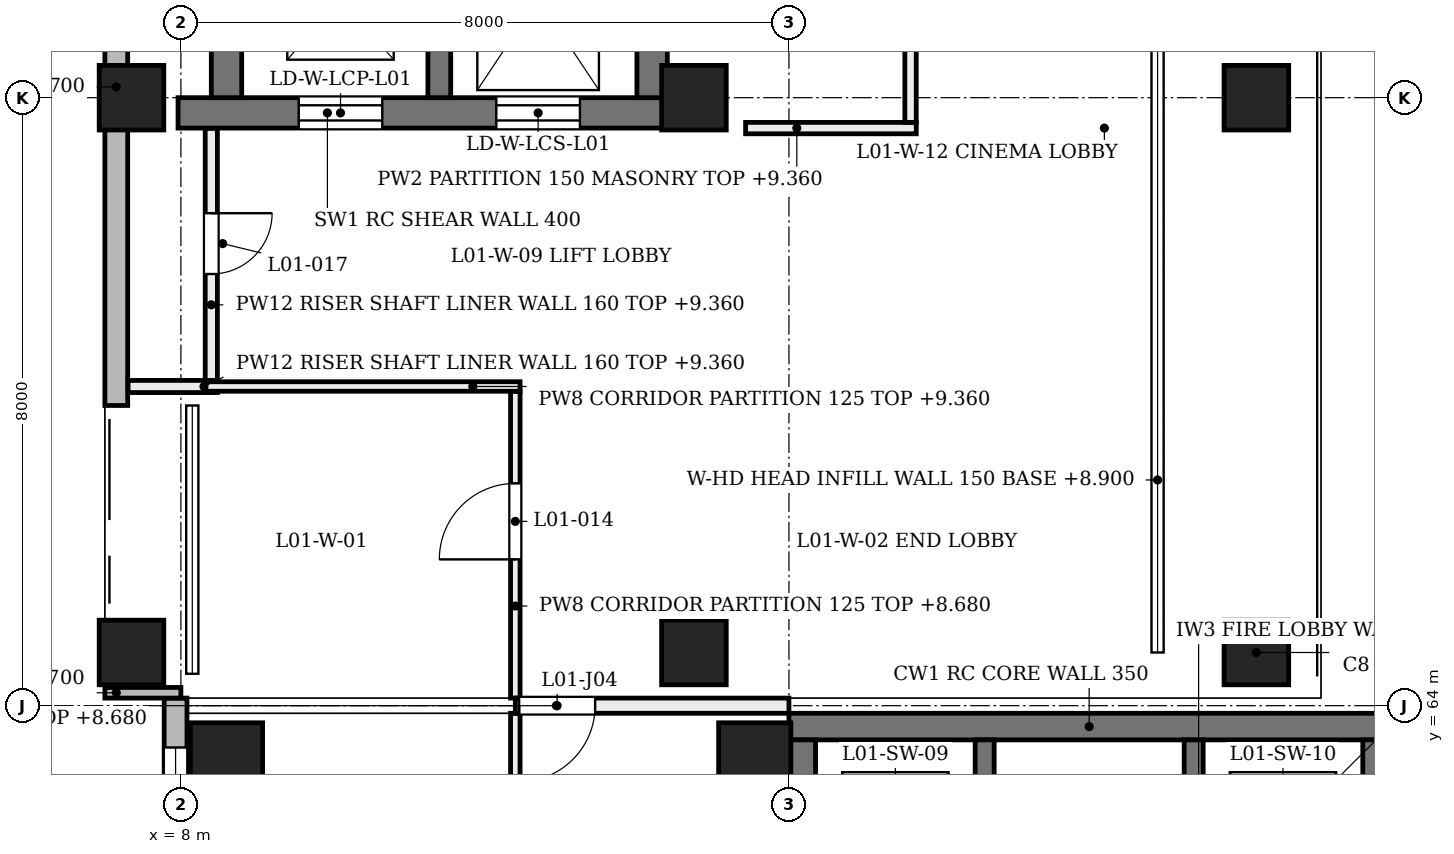
"""IFC4 building model, lengths in metres.
Left out: names, types, materials, properties, quantities, classifications, styles, units other than length and angle.
Written with IfcOpenShell. Run it as: python <this file> out.ifc"""

import sys

from ifc_helpers import new_model, si_unit, direction, frame, frame_2d, origin, origin_2d, place, context, subcontext, project, spatial, rectangle, extrude, element, fill, save


model = new_model("IFC4")
c1 = context("Model", 3, precision=1e-05, world=origin(), true_north=direction((0.0, 1.0)))
c2 = subcontext(c1, "Body", "Model", "MODEL_VIEW")
j1 = project(units=[si_unit("LENGTHUNIT", "METRE"), si_unit("PLANEANGLEUNIT", "RADIAN")], contexts=[c1])
p1 = place(None, origin())
s1 = spatial("IfcSite", under=j1, at=p1, CompositionType="ELEMENT")
p2 = place(p1, origin())
s2 = spatial("IfcBuilding", under=s1, at=p2, CompositionType="ELEMENT")
p3 = place(p2, frame((0.0, 0.0, 4.8)))
s3 = spatial("IfcBuildingStorey", under=s2, at=p3, CompositionType="ELEMENT", Elevation=4.8)
p4 = place(p3, frame((7.962, 71.8, 0.0), z_axis=(0.0, 0.0, 1.0), x_axis=(1.0, 0.0, 0.0)))
e1 = element("IfcWall", 1, at=p4, inside=s3, PredefinedType="SHEAR", context=c2, shape_type="SweptSolid", body=[
    extrude(rectangle(XDim=6.55, YDim=0.4, at=frame_2d((3.275, 0.0))), origin(), (0.0, 0.0, 1.0), 4.58),
])
p5 = place(p4, frame((1.587, 0.0, 0.0)))
e2 = element("IfcOpeningElement", 2, at=p5, cuts=e1, PredefinedType="OPENING", context=c2, shape_type="SweptSolid", body=[
    extrude(rectangle(XDim=1.1, YDim=2.1, at=frame_2d((0.55, 1.05))), frame((0.0, 0.21, 0.0), z_axis=(0.0, -1.0, 0.0), x_axis=(1.0, 0.0, 0.0)), (0.0, 0.0, 1.0), 0.42),
])
p6 = place(p4, frame((4.188, 0.0, 0.0)))
e3 = element("IfcOpeningElement", 3, at=p6, cuts=e1, PredefinedType="OPENING", context=c2, shape_type="SweptSolid", body=[
    extrude(rectangle(XDim=1.1, YDim=2.1, at=frame_2d((0.55, 1.05))), frame((0.0, 0.21, 0.0), z_axis=(0.0, -1.0, 0.0), x_axis=(1.0, 0.0, 0.0)), (0.0, 0.0, 1.0), 0.42),
])
for number, where, z_axis, x_axis in (
    (4, (8.6, 72.0, 0.0), (0.0, 0.0, 1.0), (0.0, 1.0, 0.0)),
    (5, (14.2, 72.0, 0.0), (0.0, 0.0, 1.0), (0.0, 1.0, 0.0)),
):
    element("IfcWall", number, at=place(p3, frame(where, z_axis=z_axis, x_axis=x_axis)), inside=s3, PredefinedType="SHEAR", context=c2, shape_type="SweptSolid", body=[
        extrude(rectangle(XDim=2.6, YDim=0.4, at=frame_2d((1.3, 0.0))), origin(), (0.0, 0.0, 1.0), 4.58),
    ])
p7 = place(p3, frame((11.4, 72.0, 0.0), z_axis=(0.0, 0.0, 1.0), x_axis=(0.0, 1.0, 0.0)))
e6 = element("IfcWall", 6, at=p7, inside=s3, PredefinedType="SHEAR", context=c2, shape_type="SweptSolid", body=[
    extrude(rectangle(XDim=2.6, YDim=0.3, at=frame_2d((1.3, 0.0))), origin(), (0.0, 0.0, 1.0), 4.58),
])
p8 = place(p3, frame((16.0, 63.725, 0.0), z_axis=(0.0, 0.0, 1.0), x_axis=(1.0, 0.0, 0.0)))
e7 = element("IfcWall", 7, at=p8, inside=s3, PredefinedType="SHEAR", context=c2, shape_type="SweptSolid", body=[
    extrude(rectangle(XDim=7.9, YDim=0.35, at=frame_2d((3.95, 0.0))), origin(), (0.0, 0.0, 1.0), 4.58),
])
p9 = place(p3, frame((16.175, 48.35, 0.0), z_axis=(0.0, 0.0, 1.0), x_axis=(0.0, 1.0, 0.0)))
e8 = element("IfcWall", 8, at=p9, inside=s3, PredefinedType="SHEAR", context=c2, shape_type="SweptSolid", body=[
    extrude(rectangle(XDim=15.2, YDim=0.35, at=frame_2d((7.6, 0.0))), origin(), (0.0, 0.0, 1.0), 4.58),
])
p10 = place(p9, frame((0.95, 0.0, 0.0)))
e9 = element("IfcOpeningElement", 9, at=p10, cuts=e8, PredefinedType="OPENING", context=c2, shape_type="SweptSolid", body=[
    extrude(rectangle(XDim=1.0, YDim=2.1, at=frame_2d((0.5, 1.05))), frame((0.0, 0.185, 0.0), z_axis=(0.0, -1.0, 0.0), x_axis=(1.0, 0.0, 0.0)), (0.0, 0.0, 1.0), 0.37),
])
p11 = place(p9, frame((10.6, 0.0, 0.0)))
e10 = element("IfcOpeningElement", 10, at=p11, cuts=e8, PredefinedType="OPENING", context=c2, shape_type="SweptSolid", body=[
    extrude(rectangle(XDim=1.4, YDim=2.1, at=frame_2d((0.7, 1.05))), frame((0.0, 0.185, 0.0), z_axis=(0.0, -1.0, 0.0), x_axis=(1.0, 0.0, 0.0)), (0.0, 0.0, 1.0), 0.37),
])
p12 = place(p3, frame((23.725, 48.35, 0.0), z_axis=(0.0, 0.0, 1.0), x_axis=(0.0, 1.0, 0.0)))
e11 = element("IfcWall", 11, at=p12, inside=s3, PredefinedType="SHEAR", context=c2, shape_type="SweptSolid", body=[
    extrude(rectangle(XDim=15.2, YDim=0.35, at=frame_2d((7.6, 0.0))), origin(), (0.0, 0.0, 1.0), 4.58),
])
p13 = place(p12, frame((0.95, 0.0, 0.0)))
e12 = element("IfcOpeningElement", 12, at=p13, cuts=e11, PredefinedType="OPENING", context=c2, shape_type="SweptSolid", body=[
    extrude(rectangle(XDim=1.0, YDim=2.1, at=frame_2d((0.5, 1.05))), frame((0.0, 0.185, 0.0), z_axis=(0.0, -1.0, 0.0), x_axis=(1.0, 0.0, 0.0)), (0.0, 0.0, 1.0), 0.37),
])
p14 = place(p12, frame((10.6, 0.0, 0.0)))
e13 = element("IfcOpeningElement", 13, at=p14, cuts=e11, PredefinedType="OPENING", context=c2, shape_type="SweptSolid", body=[
    extrude(rectangle(XDim=1.4, YDim=2.1, at=frame_2d((0.7, 1.05))), frame((0.0, 0.185, 0.0), z_axis=(0.0, -1.0, 0.0), x_axis=(1.0, 0.0, 0.0)), (0.0, 0.0, 1.0), 0.37),
])
for number, where, z_axis, x_axis in (
    (14, (8.6, 63.3, 0.0), (0.0, 0.0, 1.0), (1.0, 0.0, 0.0)),
    (15, (15.55, 63.3, 0.0), (0.0, 0.0, 1.0), (1.0, 0.0, 0.0)),
):
    element("IfcColumn", number, at=place(p3, frame(where, z_axis=z_axis, x_axis=x_axis)), inside=s3, PredefinedType="COLUMN", context=c2, shape_type="SweptSolid", body=[
        extrude(rectangle(XDim=0.95, YDim=0.95, at=origin_2d()), origin(), (0.0, 0.0, 1.0), 4.8),
    ])
for number, where, z_axis, x_axis in (
    (16, (7.6, 64.7, 0.0), (-0.204, 0.0, 0.979), (0.0, -1.0, 0.0)),
    (17, (7.6, 72.0, 0.0), (-0.204, 0.0, 0.979), (0.0, -1.0, 0.0)),
    (18, (15.0, 64.7, 0.0), (-0.204, 0.0, 0.979), (0.0, -1.0, 0.0)),
    (19, (15.0, 72.0, 0.0), (-0.204, 0.0, 0.979), (0.0, -1.0, 0.0)),
    (20, (22.4, 64.7, 0.0), (-0.204, 0.0, 0.979), (0.0, -1.0, 0.0)),
    (21, (22.4, 72.0, 0.0), (-0.204, 0.0, 0.979), (0.0, -1.0, 0.0)),
):
    element("IfcColumn", number, at=place(p3, frame(where, z_axis=z_axis, x_axis=x_axis)), inside=s3, PredefinedType="COLUMN", context=c2, shape_type="SweptSolid", body=[
        extrude(rectangle(XDim=0.85, YDim=0.85, at=origin_2d()), origin(), (0.0, 0.0, 1.0), 4.903),
    ])
p15 = place(p3, frame((7.15, 67.95, 0.0), z_axis=(0.0, 0.0, 1.0), x_axis=(0.0, 1.0, 0.0)))
e22 = element("IfcWall", 22, at=p15, inside=s3, PredefinedType="SOLIDWALL", context=c2, shape_type="SweptSolid", body=[
    extrude(rectangle(XDim=24.1, YDim=0.3, at=frame_2d((12.05, 0.0))), origin(), (0.0, 0.0, 1.0), 3.9),
])
p16 = place(p3, frame((20.85, 64.9, 4.1), z_axis=(0.0, 0.0, 1.0), x_axis=(0.0, 1.0, 0.0)))
e23 = element("IfcWall", 23, at=p16, inside=s3, PredefinedType="SOLIDWALL", context=c2, shape_type="SweptSolid", body=[
    extrude(rectangle(XDim=6.9, YDim=0.15, at=frame_2d((3.45, 0.0))), origin(), (0.0, 0.0, 1.0), 0.48),
])
p17 = place(p3, frame((20.85, 72.2, 4.1), z_axis=(0.0, 0.0, 1.0), x_axis=(0.0, 1.0, 0.0)))
e24 = element("IfcWall", 24, at=p17, inside=s3, PredefinedType="SOLIDWALL", context=c2, shape_type="SweptSolid", body=[
    extrude(rectangle(XDim=7.6, YDim=0.15, at=frame_2d((3.8, 0.0))), origin(), (0.0, 0.0, 1.0), 0.48),
])
p18 = place(p3, frame((7.93, 47.7, 0.0), z_axis=(0.0, 0.0, 1.0), x_axis=(0.0, 1.0, 0.0)))
e25 = element("IfcWall", 25, at=p18, inside=s3, PredefinedType="SOLIDWALL", context=c2, shape_type="SweptSolid", body=[
    extrude(rectangle(XDim=16.4, YDim=0.3, at=frame_2d((8.2, 0.0))), origin(), (0.0, 0.0, 1.0), 3.9),
])
p19 = place(p18, frame((0.45, 0.0, 0.75)))
e26 = element("IfcOpeningElement", 26, at=p19, cuts=e25, PredefinedType="OPENING", context=c2, shape_type="SweptSolid", body=[
    extrude(rectangle(XDim=1.8, YDim=3.1, at=frame_2d((0.9, 1.55))), frame((0.0, 0.16, 0.0), z_axis=(0.0, -1.0, 0.0), x_axis=(1.0, 0.0, 0.0)), (0.0, 0.0, 1.0), 0.32),
])
p20 = place(p18, frame((3.15, 0.0, 0.75)))
e27 = element("IfcOpeningElement", 27, at=p20, cuts=e25, PredefinedType="OPENING", context=c2, shape_type="SweptSolid", body=[
    extrude(rectangle(XDim=1.8, YDim=3.1, at=frame_2d((0.9, 1.55))), frame((0.0, 0.16, 0.0), z_axis=(0.0, -1.0, 0.0), x_axis=(1.0, 0.0, 0.0)), (0.0, 0.0, 1.0), 0.32),
])
p21 = place(p18, frame((5.85, 0.0, 0.75)))
e28 = element("IfcOpeningElement", 28, at=p21, cuts=e25, PredefinedType="OPENING", context=c2, shape_type="SweptSolid", body=[
    extrude(rectangle(XDim=1.8, YDim=3.1, at=frame_2d((0.9, 1.55))), frame((0.0, 0.16, 0.0), z_axis=(0.0, -1.0, 0.0), x_axis=(1.0, 0.0, 0.0)), (0.0, 0.0, 1.0), 0.32),
])
p22 = place(p18, frame((8.55, 0.0, 0.75)))
e29 = element("IfcOpeningElement", 29, at=p22, cuts=e25, PredefinedType="OPENING", context=c2, shape_type="SweptSolid", body=[
    extrude(rectangle(XDim=1.8, YDim=3.1, at=frame_2d((0.9, 1.55))), frame((0.0, 0.16, 0.0), z_axis=(0.0, -1.0, 0.0), x_axis=(1.0, 0.0, 0.0)), (0.0, 0.0, 1.0), 0.32),
])
p23 = place(p18, frame((11.25, 0.0, 0.75)))
e30 = element("IfcOpeningElement", 30, at=p23, cuts=e25, PredefinedType="OPENING", context=c2, shape_type="SweptSolid", body=[
    extrude(rectangle(XDim=1.8, YDim=3.1, at=frame_2d((0.9, 1.55))), frame((0.0, 0.16, 0.0), z_axis=(0.0, -1.0, 0.0), x_axis=(1.0, 0.0, 0.0)), (0.0, 0.0, 1.0), 0.32),
])
p24 = place(p18, frame((13.95, 0.0, 0.75)))
e31 = element("IfcOpeningElement", 31, at=p24, cuts=e25, PredefinedType="OPENING", context=c2, shape_type="SweptSolid", body=[
    extrude(rectangle(XDim=1.8, YDim=3.1, at=frame_2d((0.9, 1.55))), frame((0.0, 0.16, 0.0), z_axis=(0.0, -1.0, 0.0), x_axis=(1.0, 0.0, 0.0)), (0.0, 0.0, 1.0), 0.32),
])
p25 = place(p3, frame((7.0, 64.17, 0.0), z_axis=(0.0, 0.0, 1.0), x_axis=(1.0, 0.0, 0.0)))
e32 = element("IfcWall", 32, at=p25, inside=s3, PredefinedType="SOLIDWALL", context=c2, shape_type="SweptSolid", body=[
    extrude(rectangle(XDim=1.0, YDim=0.14, at=frame_2d((0.5, 0.0))), origin(), (0.0, 0.0, 1.0), 3.9),
])
for number, where, z_axis, x_axis in (
    (33, (18.575, 61.1, 0.0), (0.0, 0.0, 1.0), (0.0, 1.0, 0.0)),
    (34, (21.325, 61.1, 0.0), (0.0, 0.0, 1.0), (0.0, 1.0, 0.0)),
):
    element("IfcWall", number, at=place(p3, frame(where, z_axis=z_axis, x_axis=x_axis)), inside=s3, PredefinedType="SOLIDWALL", context=c2, shape_type="SweptSolid", body=[
        extrude(rectangle(XDim=2.45, YDim=0.25, at=frame_2d((1.225, 0.0))), origin(), (0.0, 0.0, 1.0), 4.55),
    ])
p26 = place(p3, frame((12.4, 54.154, 0.0), z_axis=(0.0, 0.0, 1.0), x_axis=(0.0, 1.0, 0.0)))
e35 = element("IfcWall", 35, at=p26, inside=s3, PredefinedType="PARTITIONING", context=c2, shape_type="SweptSolid", body=[
    extrude(rectangle(XDim=9.746, YDim=0.125, at=frame_2d((4.873, 0.0))), origin(), (0.0, 0.0, 1.0), 3.88),
])
p27 = place(p26, frame((6.485, 0.0, 0.0)))
e36 = element("IfcOpeningElement", 36, at=p27, cuts=e35, PredefinedType="OPENING", context=c2, shape_type="SweptSolid", body=[
    extrude(rectangle(XDim=1.0, YDim=2.1, at=frame_2d((0.5, 1.05))), frame((0.0, 0.073, 0.0), z_axis=(0.0, -1.0, 0.0), x_axis=(1.0, 0.0, 0.0)), (0.0, 0.0, 1.0), 0.145),
])
p28 = place(p3, frame((12.4, 64.1, 0.0), z_axis=(0.0, 0.0, 1.0), x_axis=(0.0, 1.0, 0.0)))
e37 = element("IfcWall", 37, at=p28, inside=s3, PredefinedType="PARTITIONING", context=c2, shape_type="SweptSolid", body=[
    extrude(rectangle(XDim=4.037, YDim=0.125, at=frame_2d((2.019, 0.0))), origin(), (0.0, 0.0, 1.0), 3.88),
])
p29 = place(p28, frame((1.825, 0.0, 0.0)))
e38 = element("IfcOpeningElement", 38, at=p29, cuts=e37, PredefinedType="OPENING", context=c2, shape_type="SweptSolid", body=[
    extrude(rectangle(XDim=1.0, YDim=2.1, at=frame_2d((0.5, 1.05))), frame((0.0, 0.073, 0.0), z_axis=(0.0, -1.0, 0.0), x_axis=(1.0, 0.0, 0.0)), (0.0, 0.0, 1.0), 0.145),
])
p30 = place(p3, frame((7.305, 68.2, 0.0), z_axis=(0.0, 0.0, 1.0), x_axis=(1.0, 0.0, 0.0)))
e39 = element("IfcWall", 39, at=p30, inside=s3, PredefinedType="PARTITIONING", context=c2, shape_type="SweptSolid", body=[
    extrude(rectangle(XDim=1.175, YDim=0.16, at=frame_2d((0.587, 0.0))), origin(), (0.0, 0.0, 1.0), 4.56),
])
p31 = place(p3, frame((8.32, 68.2, 0.0), z_axis=(0.0, 0.0, 1.0), x_axis=(1.0, 0.0, 0.0)))
e40 = element("IfcWall", 40, at=p31, inside=s3, PredefinedType="PARTITIONING", context=c2, shape_type="SweptSolid", body=[
    extrude(rectangle(XDim=4.142, YDim=0.125, at=frame_2d((2.071, 0.0))), origin(), (0.0, 0.0, 1.0), 4.56),
])
p32 = place(p3, frame((8.4, 68.28, 0.0), z_axis=(0.0, 0.0, 1.0), x_axis=(0.0, 1.0, 0.0)))
e41 = element("IfcWall", 41, at=p32, inside=s3, PredefinedType="PARTITIONING", context=c2, shape_type="SweptSolid", body=[
    extrude(rectangle(XDim=3.315, YDim=0.16, at=frame_2d((1.657, 0.0))), origin(), (0.0, 0.0, 1.0), 4.56),
])
p33 = place(p32, frame((1.4, 0.0, 0.0)))
e42 = element("IfcOpeningElement", 42, at=p33, cuts=e41, PredefinedType="OPENING", context=c2, shape_type="SweptSolid", body=[
    extrude(rectangle(XDim=0.8, YDim=2.1, at=frame_2d((0.4, 1.05))), frame((0.0, 0.09, 0.0), z_axis=(0.0, -1.0, 0.0), x_axis=(1.0, 0.0, 0.0)), (0.0, 0.0, 1.0), 0.18),
])
p34 = place(p3, frame((15.43, 71.6, 0.0), z_axis=(0.0, 0.0, 1.0), x_axis=(1.0, 0.0, 0.0)))
e43 = element("IfcWall", 43, at=p34, inside=s3, PredefinedType="PARTITIONING", context=c2, shape_type="SweptSolid", body=[
    extrude(rectangle(XDim=2.245, YDim=0.15, at=frame_2d((1.123, 0.0))), origin(), (0.0, 0.0, 1.0), 4.56),
])
p35 = place(p3, frame((17.6, 71.675, 0.0), z_axis=(0.0, 0.0, 1.0), x_axis=(0.0, 1.0, 0.0)))
e44 = element("IfcWall", 44, at=p35, inside=s3, PredefinedType="PARTITIONING", context=c2, shape_type="SweptSolid", body=[
    extrude(rectangle(XDim=3.725, YDim=0.15, at=frame_2d((1.862, 0.0))), origin(), (0.0, 0.0, 1.0), 3.98),
])
p36 = place(p35, frame((1.335, 0.0, 0.0)))
e45 = element("IfcOpeningElement", 45, at=p36, cuts=e44, PredefinedType="OPENING", context=c2, shape_type="SweptSolid", body=[
    extrude(rectangle(XDim=0.95, YDim=2.1, at=frame_2d((0.475, 1.05))), frame((0.0, 0.085, 0.0), z_axis=(0.0, -1.0, 0.0), x_axis=(1.0, 0.0, 0.0)), (0.0, 0.0, 1.0), 0.17),
])
p37 = place(p3, frame((12.4, 64.0, 0.0), z_axis=(0.0, 0.0, 1.0), x_axis=(1.0, 0.0, 0.0)))
e46 = element("IfcWall", 46, at=p37, inside=s3, PredefinedType="PARTITIONING", context=c2, shape_type="SweptSolid", body=[
    extrude(rectangle(XDim=3.6, YDim=0.2, at=frame_2d((1.8, 0.0))), origin(), (0.0, 0.0, 1.0), 3.88),
])
p38 = place(p37, frame((0.05, 0.0, 0.0)))
e47 = element("IfcOpeningElement", 47, at=p38, cuts=e46, PredefinedType="OPENING", context=c2, shape_type="SweptSolid", body=[
    extrude(rectangle(XDim=1.0, YDim=2.1, at=frame_2d((0.5, 1.05))), frame((0.0, 0.11, 0.0), z_axis=(0.0, -1.0, 0.0), x_axis=(1.0, 0.0, 0.0)), (0.0, 0.0, 1.0), 0.22),
])
p39 = place(p24, origin())
e48 = element("IfcWindow", 48, at=p39, inside=s3, PartitioningType="SINGLE_PANEL", PredefinedType="WINDOW", context=c2, shape_type="SweptSolid", body=[
    extrude(rectangle(XDim=1.8, YDim=3.1, at=frame_2d((0.9, 1.55))), frame((0.0, 0.03, 0.0), z_axis=(0.0, -1.0, 0.0), x_axis=(1.0, 0.0, 0.0)), (0.0, 0.0, 1.0), 0.06),
])
fill(e31, e48)
p40 = place(p5, frame((1.1, 0.0, 0.0), z_axis=(0.0, 0.0, 1.0), x_axis=(-1.0, 0.0, 0.0)))
e49 = element("IfcDoor", 49, at=p40, inside=s3, OperationType="DOUBLE_DOOR_SLIDING", PredefinedType="DOOR", context=c2, shape_type="SweptSolid", body=[
    extrude(rectangle(XDim=1.1, YDim=2.1, at=frame_2d((0.55, 1.05))), frame((0.0, 0.025, 0.0), z_axis=(0.0, -1.0, 0.0), x_axis=(1.0, 0.0, 0.0)), (0.0, 0.0, 1.0), 0.05),
])
fill(e2, e49)
p41 = place(p6, frame((1.1, 0.0, 0.0), z_axis=(0.0, 0.0, 1.0), x_axis=(-1.0, 0.0, 0.0)))
e50 = element("IfcDoor", 50, at=p41, inside=s3, OperationType="DOUBLE_DOOR_SLIDING", PredefinedType="DOOR", context=c2, shape_type="SweptSolid", body=[
    extrude(rectangle(XDim=1.1, YDim=2.1, at=frame_2d((0.55, 1.05))), frame((0.0, 0.025, 0.0), z_axis=(0.0, -1.0, 0.0), x_axis=(1.0, 0.0, 0.0)), (0.0, 0.0, 1.0), 0.05),
])
fill(e3, e50)
p42 = place(p29, origin())
e51 = element("IfcDoor", 51, at=p42, inside=s3, OperationType="SINGLE_SWING_LEFT", PredefinedType="DOOR", context=c2, shape_type="SweptSolid", body=[
    extrude(rectangle(XDim=1.0, YDim=2.1, at=frame_2d((0.5, 1.05))), frame((0.0, 0.025, 0.0), z_axis=(0.0, -1.0, 0.0), x_axis=(1.0, 0.0, 0.0)), (0.0, 0.0, 1.0), 0.05),
])
fill(e38, e51)
p43 = place(p33, origin())
e52 = element("IfcDoor", 52, at=p43, inside=s3, OperationType="SINGLE_SWING_RIGHT", PredefinedType="DOOR", context=c2, shape_type="SweptSolid", body=[
    extrude(rectangle(XDim=0.8, YDim=2.1, at=frame_2d((0.4, 1.05))), frame((0.0, 0.025, 0.0), z_axis=(0.0, -1.0, 0.0), x_axis=(1.0, 0.0, 0.0)), (0.0, 0.0, 1.0), 0.05),
])
fill(e42, e52)
p44 = place(p38, frame((1.0, 0.0, 0.0), z_axis=(0.0, 0.0, 1.0), x_axis=(-1.0, 0.0, 0.0)))
e53 = element("IfcDoor", 53, at=p44, inside=s3, OperationType="SINGLE_SWING_LEFT", PredefinedType="DOOR", context=c2, shape_type="SweptSolid", body=[
    extrude(rectangle(XDim=1.0, YDim=2.1, at=frame_2d((0.5, 1.05))), frame((0.0, 0.025, 0.0), z_axis=(0.0, -1.0, 0.0), x_axis=(1.0, 0.0, 0.0)), (0.0, 0.0, 1.0), 0.05),
])
fill(e47, e53)
save(model, sys.argv[1])
